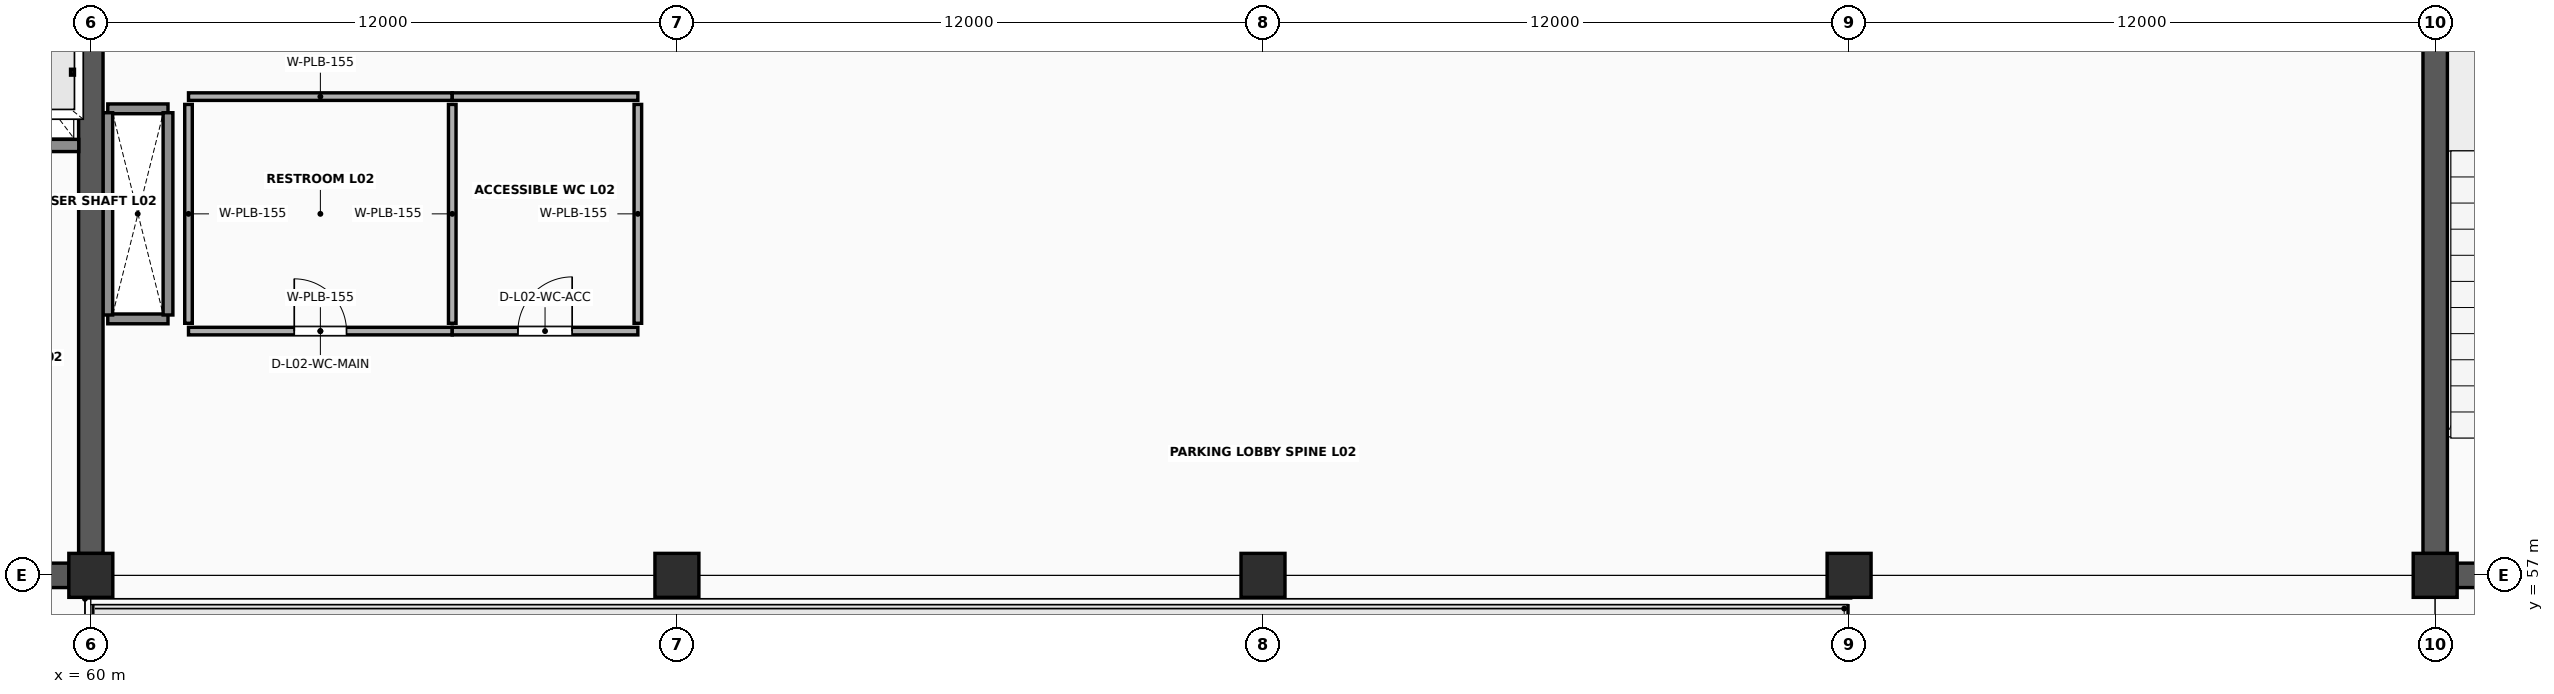
"""IFC4 building model, lengths in metres.
Left out: names, types, materials, properties, quantities, classifications, styles, units other than length and angle.
Written with IfcOpenShell. Run it as: python <this file> out.ifc"""

import sys

from ifc_helpers import new_model, si_unit, direction, frame, frame_2d, origin, origin_2d, place, context, subcontext, project, spatial, rectangle, extrude, element, fill, save


model = new_model("IFC4")
c1 = context("Model", 3, precision=1e-05, world=origin(), true_north=direction((0.0, 1.0)))
c2 = subcontext(c1, "Body", "Model", "MODEL_VIEW")
j1 = project(units=[si_unit("LENGTHUNIT", "METRE"), si_unit("PLANEANGLEUNIT", "RADIAN")], contexts=[c1])
p1 = place(None, origin())
s1 = spatial("IfcSite", under=j1, at=p1, CompositionType="ELEMENT")
p2 = place(p1, origin())
s2 = spatial("IfcBuilding", under=s1, at=p2, CompositionType="ELEMENT")
p3 = place(p2, frame((0.0, 0.0, 9.6)))
s3 = spatial("IfcBuildingStorey", under=s2, at=p3, CompositionType="ELEMENT", Elevation=9.6)
for number, where, z_axis, x_axis in (
    (1, (60.0, 57.0, 0.0), (0.0, 0.0, 1.0), (1.0, 0.0, 0.0)),
    (2, (72.0, 57.0, 0.0), (0.0, 0.0, 1.0), (1.0, 0.0, 0.0)),
    (3, (84.0, 57.0, 0.0), (0.0, 0.0, 1.0), (1.0, 0.0, 0.0)),
    (4, (96.0, 57.0, 0.0), (0.0, 0.0, 1.0), (1.0, 0.0, 0.0)),
    (5, (108.0, 57.0, 0.0), (0.0, 0.0, 1.0), (1.0, 0.0, 0.0)),
):
    element("IfcColumn", number, at=place(p3, frame(where, z_axis=z_axis, x_axis=x_axis)), inside=s3, PredefinedType="COLUMN", context=c2, shape_type="SweptSolid", body=[
        extrude(rectangle(XDim=0.9, YDim=0.9, at=origin_2d()), origin(), (0.0, 0.0, 1.0), 3.8),
    ])
for number, where, z_axis, x_axis in (
    (6, (60.347, 62.25, 0.0), (0.0, 0.0, 1.0), (1.0, 0.0, 0.0)),
    (7, (60.347, 66.55, 0.0), (0.0, 0.0, 1.0), (1.0, 0.0, 0.0)),
):
    element("IfcWall", number, at=place(p3, frame(where, z_axis=z_axis, x_axis=x_axis)), inside=s3, PredefinedType="SOLIDWALL", context=c2, shape_type="SweptSolid", body=[
        extrude(rectangle(XDim=1.233, YDim=0.2, at=frame_2d((0.617, 0.0))), origin(), (0.0, 0.0, 1.0), 3.638),
    ])
for number, where, z_axis, x_axis in (
    (8, (60.347, 62.33, 0.0), (0.0, 0.0, 1.0), (0.0, 1.0, 0.0)),
    (9, (61.58, 62.33, 0.0), (0.0, 0.0, 1.0), (0.0, 1.0, 0.0)),
):
    element("IfcWall", number, at=place(p3, frame(where, z_axis=z_axis, x_axis=x_axis)), inside=s3, PredefinedType="SOLIDWALL", context=c2, shape_type="SweptSolid", body=[
        extrude(rectangle(XDim=4.14, YDim=0.2, at=frame_2d((2.07, 0.0))), origin(), (0.0, 0.0, 1.0), 3.638),
    ])
p4 = place(p3, frame((48.447, 57.0, 0.0), z_axis=(0.0, 0.0, 1.0), x_axis=(1.0, 0.0, 0.0)))
e10 = element("IfcWall", 10, at=p4, inside=s3, PredefinedType="SHEAR", context=c2, shape_type="SweptSolid", body=[
    extrude(rectangle(XDim=11.106, YDim=0.5, at=frame_2d((5.553, 0.0))), origin(), (0.0, 0.0, 1.0), 3.638),
])
p5 = place(p4, frame((4.753, 0.0, 0.0)))
e11 = element("IfcOpeningElement", 11, at=p5, cuts=e10, PredefinedType="OPENING", context=c2, shape_type="SweptSolid", body=[
    extrude(rectangle(XDim=1.2, YDim=2.2, at=frame_2d((0.6, 1.1))), frame((0.0, 0.265, 0.0), z_axis=(0.0, -1.0, 0.0), x_axis=(1.0, 0.0, 0.0)), (0.0, 0.0, 1.0), 0.53),
])
p6 = place(p4, frame((8.453, 0.0, 0.0)))
e12 = element("IfcOpeningElement", 12, at=p6, cuts=e10, PredefinedType="OPENING", context=c2, shape_type="SweptSolid", body=[
    extrude(rectangle(XDim=1.5, YDim=2.25, at=frame_2d((0.75, 1.125))), frame((0.0, 0.265, 0.0), z_axis=(0.0, -1.0, 0.0), x_axis=(1.0, 0.0, 0.0)), (0.0, 0.0, 1.0), 0.53),
])
p7 = place(p3, frame((60.0, 57.447, 0.0), z_axis=(0.0, 0.0, 1.0), x_axis=(0.0, 1.0, 0.0)))
e13 = element("IfcWall", 13, at=p7, inside=s3, PredefinedType="SHEAR", context=c2, shape_type="SweptSolid", body=[
    extrude(rectangle(XDim=11.106, YDim=0.5, at=frame_2d((5.553, 0.0))), origin(), (0.0, 0.0, 1.0), 3.638),
])
p8 = place(p3, frame((52.597, 65.8, 0.0), z_axis=(0.0, 0.0, 1.0), x_axis=(1.0, 0.0, 0.0)))
e14 = element("IfcWall", 14, at=p8, inside=s3, PredefinedType="SOLIDWALL", context=c2, shape_type="SweptSolid", body=[
    extrude(rectangle(XDim=7.156, YDim=0.25, at=frame_2d((3.578, 0.0))), origin(), (0.0, 0.0, 1.0), 3.638),
])
p9 = place(p8, frame((0.653, 0.0, 0.0)))
e15 = element("IfcOpeningElement", 15, at=p9, cuts=e14, PredefinedType="OPENING", context=c2, shape_type="SweptSolid", body=[
    extrude(rectangle(XDim=1.1, YDim=2.24, at=frame_2d((0.55, 1.12))), frame((0.0, 0.14, 0.0), z_axis=(0.0, -1.0, 0.0), x_axis=(1.0, 0.0, 0.0)), (0.0, 0.0, 1.0), 0.28),
])
p10 = place(p8, frame((3.153, 0.0, 0.0)))
e16 = element("IfcOpeningElement", 16, at=p10, cuts=e14, PredefinedType="OPENING", context=c2, shape_type="SweptSolid", body=[
    extrude(rectangle(XDim=1.05, YDim=2.2, at=frame_2d((0.525, 1.1))), frame((0.0, 0.14, 0.0), z_axis=(0.0, -1.0, 0.0), x_axis=(1.0, 0.0, 0.0)), (0.0, 0.0, 1.0), 0.28),
])
p11 = place(p8, frame((5.528, 0.0, 0.0)))
e17 = element("IfcOpeningElement", 17, at=p11, cuts=e14, PredefinedType="OPENING", context=c2, shape_type="SweptSolid", body=[
    extrude(rectangle(XDim=1.05, YDim=2.2, at=frame_2d((0.525, 1.1))), frame((0.0, 0.14, 0.0), z_axis=(0.0, -1.0, 0.0), x_axis=(1.0, 0.0, 0.0)), (0.0, 0.0, 1.0), 0.28),
])
p12 = place(p3, frame((108.447, 57.0, 0.0), z_axis=(0.0, 0.0, 1.0), x_axis=(1.0, 0.0, 0.0)))
e18 = element("IfcWall", 18, at=p12, inside=s3, PredefinedType="SHEAR", context=c2, shape_type="SweptSolid", body=[
    extrude(rectangle(XDim=11.106, YDim=0.5, at=frame_2d((5.553, 0.0))), origin(), (0.0, 0.0, 1.0), 3.638),
])
p13 = place(p12, frame((4.753, 0.0, 0.0)))
e19 = element("IfcOpeningElement", 19, at=p13, cuts=e18, PredefinedType="OPENING", context=c2, shape_type="SweptSolid", body=[
    extrude(rectangle(XDim=1.2, YDim=2.2, at=frame_2d((0.6, 1.1))), frame((0.0, 0.265, 0.0), z_axis=(0.0, -1.0, 0.0), x_axis=(1.0, 0.0, 0.0)), (0.0, 0.0, 1.0), 0.53),
])
p14 = place(p12, frame((8.453, 0.0, 0.0)))
e20 = element("IfcOpeningElement", 20, at=p14, cuts=e18, PredefinedType="OPENING", context=c2, shape_type="SweptSolid", body=[
    extrude(rectangle(XDim=1.5, YDim=2.25, at=frame_2d((0.75, 1.125))), frame((0.0, 0.265, 0.0), z_axis=(0.0, -1.0, 0.0), x_axis=(1.0, 0.0, 0.0)), (0.0, 0.0, 1.0), 0.53),
])
p15 = place(p3, frame((108.0, 57.447, 0.0), z_axis=(0.0, 0.0, 1.0), x_axis=(0.0, 1.0, 0.0)))
e21 = element("IfcWall", 21, at=p15, inside=s3, PredefinedType="SHEAR", context=c2, shape_type="SweptSolid", body=[
    extrude(rectangle(XDim=11.106, YDim=0.5, at=frame_2d((5.553, 0.0))), origin(), (0.0, 0.0, 1.0), 3.638),
])
p16 = place(p3, frame((62.0, 62.0, 0.0), z_axis=(0.0, 0.0, 1.0), x_axis=(1.0, 0.0, 0.0)))
e22 = element("IfcWall", 22, at=p16, inside=s3, PredefinedType="PLUMBINGWALL", context=c2, shape_type="SweptSolid", body=[
    extrude(rectangle(XDim=5.4, YDim=0.155, at=frame_2d((2.7, 0.0))), origin(), (0.0, 0.0, 1.0), 2.75),
])
p17 = place(p16, frame((2.165, 0.0, 0.0)))
e23 = element("IfcOpeningElement", 23, at=p17, cuts=e22, PredefinedType="OPENING", context=c2, shape_type="SweptSolid", body=[
    extrude(rectangle(XDim=1.07, YDim=2.19, at=frame_2d((0.535, 1.095))), frame((0.0, 0.093, 0.0), z_axis=(0.0, -1.0, 0.0), x_axis=(1.0, 0.0, 0.0)), (0.0, 0.0, 1.0), 0.185),
])
p18 = place(p3, frame((62.0, 66.8, 0.0), z_axis=(0.0, 0.0, 1.0), x_axis=(1.0, 0.0, 0.0)))
e24 = element("IfcWall", 24, at=p18, inside=s3, PredefinedType="PLUMBINGWALL", context=c2, shape_type="SweptSolid", body=[
    extrude(rectangle(XDim=5.4, YDim=0.155, at=frame_2d((2.7, 0.0))), origin(), (0.0, 0.0, 1.0), 2.75),
])
for number, where, z_axis, x_axis in (
    (25, (62.0, 62.16, 0.0), (0.0, 0.0, 1.0), (0.0, 1.0, 0.0)),
    (26, (67.4, 62.16, 0.0), (0.0, 0.0, 1.0), (0.0, 1.0, 0.0)),
):
    element("IfcWall", number, at=place(p3, frame(where, z_axis=z_axis, x_axis=x_axis)), inside=s3, PredefinedType="PLUMBINGWALL", context=c2, shape_type="SweptSolid", body=[
        extrude(rectangle(XDim=4.48, YDim=0.155, at=frame_2d((2.24, 0.0))), origin(), (0.0, 0.0, 1.0), 2.75),
    ])
p19 = place(p3, frame((67.4, 62.0, 0.0), z_axis=(0.0, 0.0, 1.0), x_axis=(1.0, 0.0, 0.0)))
e27 = element("IfcWall", 27, at=p19, inside=s3, PredefinedType="PLUMBINGWALL", context=c2, shape_type="SweptSolid", body=[
    extrude(rectangle(XDim=3.8, YDim=0.155, at=frame_2d((1.9, 0.0))), origin(), (0.0, 0.0, 1.0), 2.75),
])
p20 = place(p19, frame((1.345, 0.0, 0.0)))
e28 = element("IfcOpeningElement", 28, at=p20, cuts=e27, PredefinedType="OPENING", context=c2, shape_type="SweptSolid", body=[
    extrude(rectangle(XDim=1.11, YDim=2.21, at=frame_2d((0.555, 1.105))), frame((0.0, 0.093, 0.0), z_axis=(0.0, -1.0, 0.0), x_axis=(1.0, 0.0, 0.0)), (0.0, 0.0, 1.0), 0.185),
])
p21 = place(p3, frame((67.4, 66.8, 0.0), z_axis=(0.0, 0.0, 1.0), x_axis=(1.0, 0.0, 0.0)))
e29 = element("IfcWall", 29, at=p21, inside=s3, PredefinedType="PLUMBINGWALL", context=c2, shape_type="SweptSolid", body=[
    extrude(rectangle(XDim=3.8, YDim=0.155, at=frame_2d((1.9, 0.0))), origin(), (0.0, 0.0, 1.0), 2.75),
])
p22 = place(p3, frame((71.2, 62.16, 0.0), z_axis=(0.0, 0.0, 1.0), x_axis=(0.0, 1.0, 0.0)))
e30 = element("IfcWall", 30, at=p22, inside=s3, PredefinedType="PLUMBINGWALL", context=c2, shape_type="SweptSolid", body=[
    extrude(rectangle(XDim=4.48, YDim=0.155, at=frame_2d((2.24, 0.0))), origin(), (0.0, 0.0, 1.0), 2.75),
])
p23 = place(p17, origin())
e31 = element("IfcDoor", 31, at=p23, inside=s3, OperationType="SINGLE_SWING_LEFT", PredefinedType="DOOR", context=c2, shape_type="SweptSolid", body=[
    extrude(rectangle(XDim=1.07, YDim=2.19, at=frame_2d((0.535, 1.095))), frame((0.0, 0.025, 0.0), z_axis=(0.0, -1.0, 0.0), x_axis=(1.0, 0.0, 0.0)), (0.0, 0.0, 1.0), 0.05),
])
fill(e23, e31)
p24 = place(p20, origin())
e32 = element("IfcDoor", 32, at=p24, inside=s3, OperationType="SINGLE_SWING_RIGHT", PredefinedType="DOOR", context=c2, shape_type="SweptSolid", body=[
    extrude(rectangle(XDim=1.11, YDim=2.21, at=frame_2d((0.555, 1.105))), frame((0.0, 0.025, 0.0), z_axis=(0.0, -1.0, 0.0), x_axis=(1.0, 0.0, 0.0)), (0.0, 0.0, 1.0), 0.05),
])
fill(e28, e32)
save(model, sys.argv[1])
